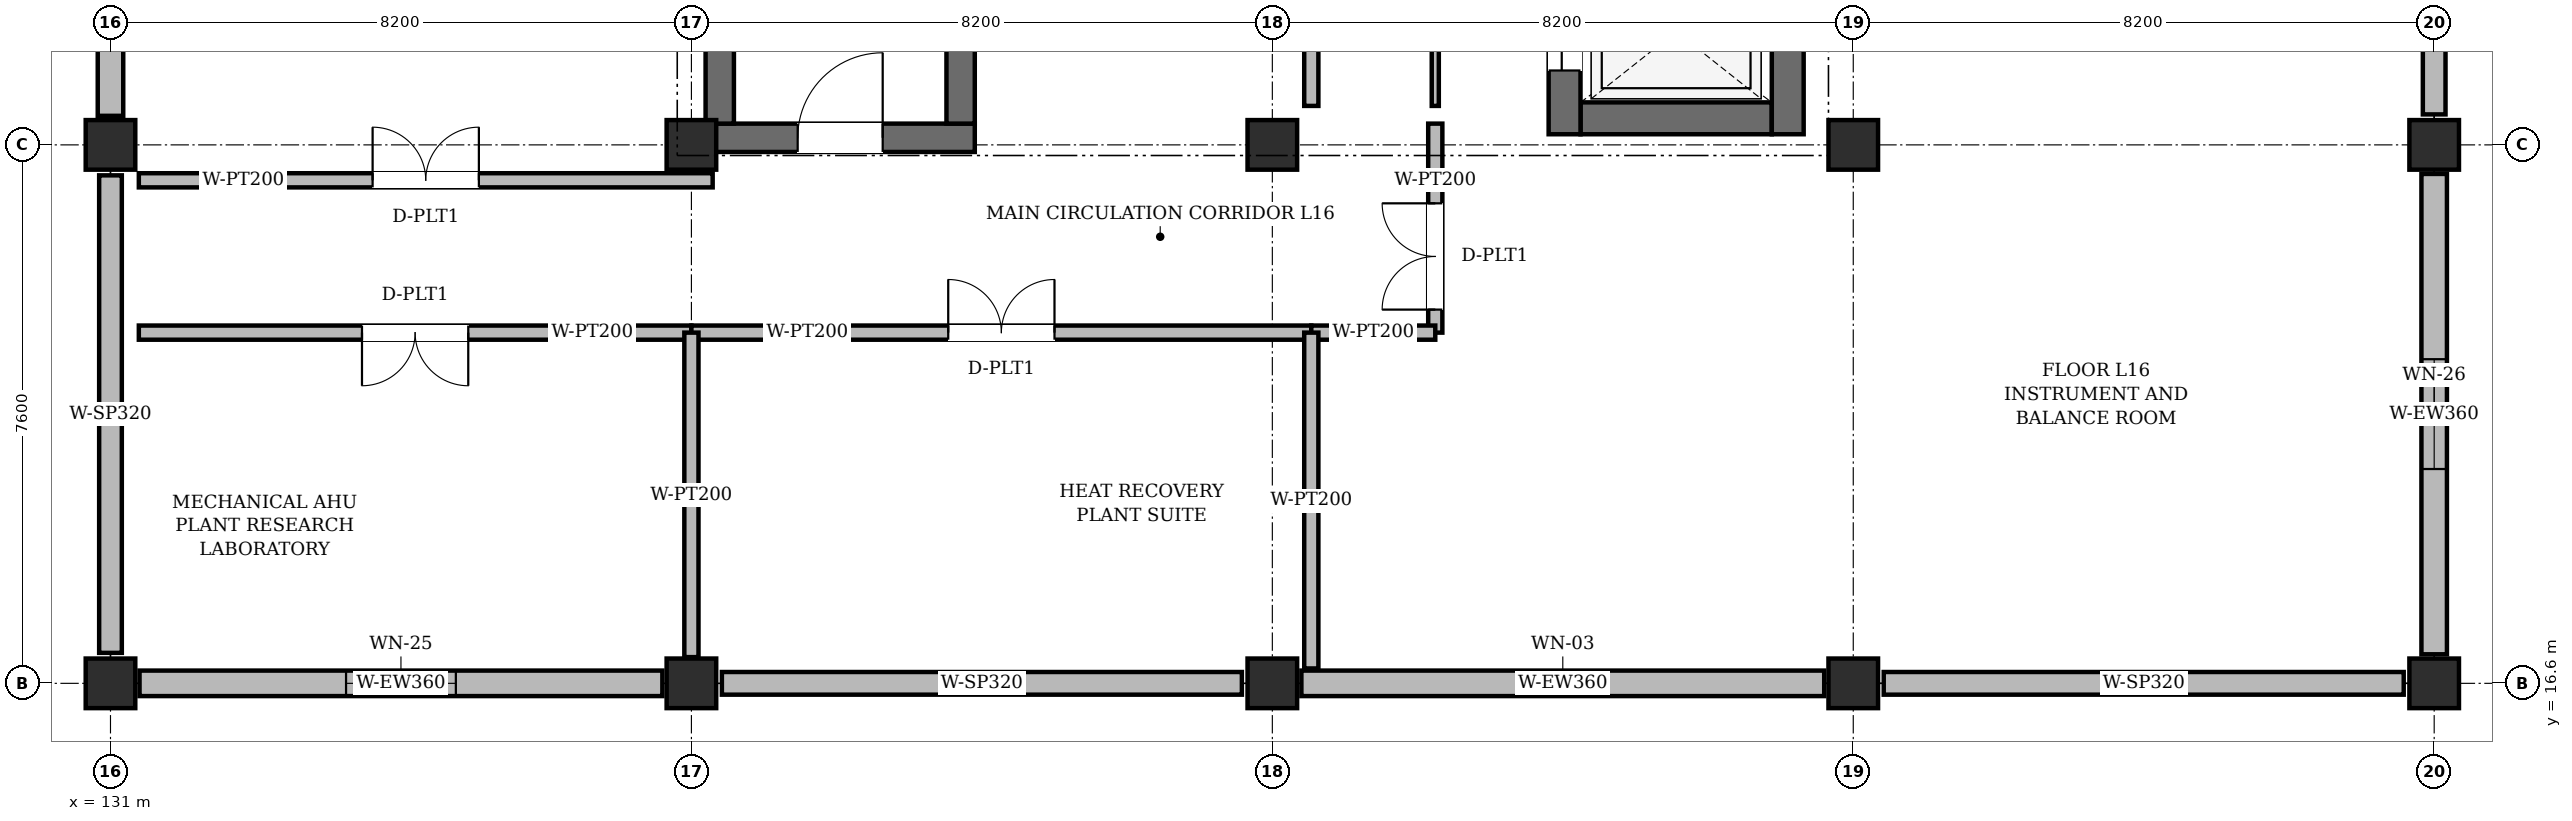
"""IFC4 building model, lengths in metres.
Left out: names, types, materials, properties, quantities, classifications, styles, units other than length and angle.
Written with IfcOpenShell. Run it as: python <this file> out.ifc"""

import sys

from ifc_helpers import new_model, si_unit, direction, frame, frame_2d, origin, origin_2d, place, context, subcontext, project, spatial, rectangle, extrude, element, fill, save


model = new_model("IFC4")
c1 = context("Model", 3, precision=1e-05, world=origin(), true_north=direction((0.0, 1.0)))
c2 = subcontext(c1, "Body", "Model", "MODEL_VIEW")
j1 = project(units=[si_unit("LENGTHUNIT", "METRE"), si_unit("PLANEANGLEUNIT", "RADIAN")], contexts=[c1])
p1 = place(None, origin())
s1 = spatial("IfcSite", under=j1, at=p1, CompositionType="ELEMENT")
p2 = place(p1, origin())
s2 = spatial("IfcBuilding", under=s1, at=p2, CompositionType="ELEMENT")
p3 = place(p2, frame((0.0, 0.0, 70.2)))
s3 = spatial("IfcBuildingStorey", under=s2, at=p3, CompositionType="ELEMENT", Elevation=70.2)
for number, where, z_axis, x_axis in (
    (1, (131.0, 16.6, 0.0), (0.0, 0.0, 1.0), (1.0, 0.0, 0.0)),
    (2, (131.0, 24.2, 0.0), (0.0, 0.0, 1.0), (1.0, 0.0, 0.0)),
    (3, (139.2, 16.6, 0.0), (0.0, 0.0, 1.0), (1.0, 0.0, 0.0)),
    (4, (139.2, 24.2, 0.0), (0.0, 0.0, 1.0), (1.0, 0.0, 0.0)),
    (5, (147.4, 16.6, 0.0), (0.0, 0.0, 1.0), (1.0, 0.0, 0.0)),
    (6, (147.4, 24.2, 0.0), (0.0, 0.0, 1.0), (1.0, 0.0, 0.0)),
    (7, (155.6, 16.6, 0.0), (0.0, 0.0, 1.0), (1.0, 0.0, 0.0)),
    (8, (155.6, 24.2, 0.0), (0.0, 0.0, 1.0), (1.0, 0.0, 0.0)),
    (9, (163.8, 16.6, 0.0), (0.0, 0.0, 1.0), (1.0, 0.0, 0.0)),
    (10, (163.8, 24.2, 0.0), (0.0, 0.0, 1.0), (1.0, 0.0, 0.0)),
):
    element("IfcColumn", number, at=place(p3, frame(where, z_axis=z_axis, x_axis=x_axis)), inside=s3, PredefinedType="COLUMN", context=c2, shape_type="SweptSolid", body=[
        extrude(rectangle(XDim=0.7, YDim=0.7, at=origin_2d()), origin(), (0.0, 0.0, 1.0), 3.67),
    ])
p4 = place(p3, frame((131.41, 16.6, 0.0), z_axis=(0.0, 0.0, 1.0), x_axis=(1.0, 0.0, 0.0)))
e11 = element("IfcWall", 11, at=p4, inside=s3, PredefinedType="SOLIDWALL", context=c2, shape_type="SweptSolid", body=[
    extrude(rectangle(XDim=7.38, YDim=0.36, at=frame_2d((3.69, 0.0))), origin(), (0.0, 0.0, 1.0), 3.055),
])
p5 = place(p4, frame((2.915, 0.0, 0.95)))
e12 = element("IfcOpeningElement", 12, at=p5, cuts=e11, PredefinedType="OPENING", context=c2, shape_type="SweptSolid", body=[
    extrude(rectangle(XDim=1.55, YDim=1.25, at=frame_2d((0.775, 0.625))), frame((0.0, 0.192, 0.0), z_axis=(0.0, -1.0, 0.0), x_axis=(1.0, 0.0, 0.0)), (0.0, 0.0, 1.0), 0.384),
])
p6 = place(p3, frame((139.63, 16.6, 0.0), z_axis=(0.0, 0.0, 1.0), x_axis=(1.0, 0.0, 0.0)))
e13 = element("IfcWall", 13, at=p6, inside=s3, PredefinedType="PARAPET", context=c2, shape_type="SweptSolid", body=[
    extrude(rectangle(XDim=7.34, YDim=0.32, at=frame_2d((3.67, 0.0))), origin(), (0.0, 0.0, 1.0), 0.25),
])
p7 = place(p3, frame((147.81, 16.6, 0.0), z_axis=(0.0, 0.0, 1.0), x_axis=(1.0, 0.0, 0.0)))
e14 = element("IfcWall", 14, at=p7, inside=s3, PredefinedType="SOLIDWALL", context=c2, shape_type="SweptSolid", body=[
    extrude(rectangle(XDim=7.38, YDim=0.36, at=frame_2d((3.69, 0.0))), origin(), (0.0, 0.0, 1.0), 3.055),
])
p8 = place(p7, frame((3.315, 0.0, 0.95)))
e15 = element("IfcOpeningElement", 15, at=p8, cuts=e14, PredefinedType="OPENING", context=c2, shape_type="SweptSolid", body=[
    extrude(rectangle(XDim=0.75, YDim=1.8, at=frame_2d((0.375, 0.9))), frame((0.0, 0.192, 0.0), z_axis=(0.0, -1.0, 0.0), x_axis=(1.0, 0.0, 0.0)), (0.0, 0.0, 1.0), 0.384),
])
p9 = place(p3, frame((156.03, 16.6, 0.0), z_axis=(0.0, 0.0, 1.0), x_axis=(1.0, 0.0, 0.0)))
e16 = element("IfcWall", 16, at=p9, inside=s3, PredefinedType="PARAPET", context=c2, shape_type="SweptSolid", body=[
    extrude(rectangle(XDim=7.34, YDim=0.32, at=frame_2d((3.67, 0.0))), origin(), (0.0, 0.0, 1.0), 0.25),
])
p10 = place(p3, frame((163.8, 17.01, 0.0), z_axis=(0.0, 0.0, 1.0), x_axis=(0.0, 1.0, 0.0)))
e17 = element("IfcWall", 17, at=p10, inside=s3, PredefinedType="SOLIDWALL", context=c2, shape_type="SweptSolid", body=[
    extrude(rectangle(XDim=6.78, YDim=0.36, at=frame_2d((3.39, 0.0))), origin(), (0.0, 0.0, 1.0), 3.055),
])
p11 = place(p10, frame((2.615, 0.0, 0.95)))
e18 = element("IfcOpeningElement", 18, at=p11, cuts=e17, PredefinedType="OPENING", context=c2, shape_type="SweptSolid", body=[
    extrude(rectangle(XDim=1.55, YDim=1.5, at=frame_2d((0.775, 0.75))), frame((0.0, 0.192, 0.0), z_axis=(0.0, -1.0, 0.0), x_axis=(1.0, 0.0, 0.0)), (0.0, 0.0, 1.0), 0.384),
])
p12 = place(p3, frame((163.8, 24.63, 0.0), z_axis=(0.0, 0.0, 1.0), x_axis=(0.0, 1.0, 0.0)))
e19 = element("IfcWall", 19, at=p12, inside=s3, PredefinedType="PARAPET", context=c2, shape_type="SweptSolid", body=[
    extrude(rectangle(XDim=6.74, YDim=0.32, at=frame_2d((3.37, 0.0))), origin(), (0.0, 0.0, 1.0), 0.25),
])
p13 = place(p3, frame((131.0, 31.39, 0.0), z_axis=(0.0, 0.0, 1.0), x_axis=(0.0, -1.0, 0.0)))
e20 = element("IfcWall", 20, at=p13, inside=s3, PredefinedType="SOLIDWALL", context=c2, shape_type="SweptSolid", body=[
    extrude(rectangle(XDim=6.78, YDim=0.36, at=frame_2d((3.39, 0.0))), origin(), (0.0, 0.0, 1.0), 3.055),
])
p14 = place(p13, frame((2.64, 0.0, 0.75)))
e21 = element("IfcOpeningElement", 21, at=p14, cuts=e20, PredefinedType="OPENING", context=c2, shape_type="SweptSolid", body=[
    extrude(rectangle(XDim=1.5, YDim=2.1, at=frame_2d((0.75, 1.05))), frame((0.0, 0.192, 0.0), z_axis=(0.0, -1.0, 0.0), x_axis=(1.0, 0.0, 0.0)), (0.0, 0.0, 1.0), 0.384),
])
p15 = place(p3, frame((131.0, 23.77, 0.0), z_axis=(0.0, 0.0, 1.0), x_axis=(0.0, -1.0, 0.0)))
e22 = element("IfcWall", 22, at=p15, inside=s3, PredefinedType="PARAPET", context=c2, shape_type="SweptSolid", body=[
    extrude(rectangle(XDim=6.74, YDim=0.32, at=frame_2d((3.37, 0.0))), origin(), (0.0, 0.0, 1.0), 0.25),
])
p16 = place(p3, frame((139.4, 24.3, 0.0), z_axis=(0.0, 0.0, 1.0), x_axis=(1.0, 0.0, 0.0)))
e23 = element("IfcWall", 23, at=p16, inside=s3, PredefinedType="SHEAR", context=c2, shape_type="SweptSolid", body=[
    extrude(rectangle(XDim=3.8, YDim=0.4, at=frame_2d((1.9, 0.0))), origin(), (0.0, 0.0, 1.0), 3.67),
])
p17 = place(p16, frame((1.3, 0.0, 0.0)))
e24 = element("IfcOpeningElement", 24, at=p17, cuts=e23, PredefinedType="OPENING", context=c2, shape_type="SweptSolid", body=[
    extrude(rectangle(XDim=1.2, YDim=2.2, at=frame_2d((0.6, 1.1))), frame((0.0, 0.212, 0.0), z_axis=(0.0, -1.0, 0.0), x_axis=(1.0, 0.0, 0.0)), (0.0, 0.0, 1.0), 0.424),
])
for number, where, z_axis, x_axis in (
    (25, (139.6, 24.5, 0.0), (0.0, 0.0, 1.0), (0.0, 1.0, 0.0)),
    (26, (143.0, 24.5, 0.0), (0.0, 0.0, 1.0), (0.0, 1.0, 0.0)),
):
    element("IfcWall", number, at=place(p3, frame(where, z_axis=z_axis, x_axis=x_axis)), inside=s3, PredefinedType="SHEAR", context=c2, shape_type="SweptSolid", body=[
        extrude(rectangle(XDim=7.0, YDim=0.4, at=frame_2d((3.5, 0.0))), origin(), (0.0, 0.0, 1.0), 3.67),
    ])
p18 = place(p3, frame((151.75, 24.575, 0.0), z_axis=(0.0, 0.0, 1.0), x_axis=(1.0, 0.0, 0.0)))
e27 = element("IfcWall", 27, at=p18, inside=s3, PredefinedType="SHEAR", context=c2, shape_type="SweptSolid", body=[
    extrude(rectangle(XDim=2.7, YDim=0.45, at=frame_2d((1.35, 0.0))), origin(), (0.0, 0.0, 1.0), 3.67),
])
p19 = place(p3, frame((151.525, 24.35, 0.0), z_axis=(0.0, 0.0, 1.0), x_axis=(0.0, 1.0, 0.0)))
e28 = element("IfcWall", 28, at=p19, inside=s3, PredefinedType="SHEAR", context=c2, shape_type="SweptSolid", body=[
    extrude(rectangle(XDim=2.9, YDim=0.45, at=frame_2d((1.45, 0.0))), origin(), (0.0, 0.0, 1.0), 3.67),
])
p20 = place(p19, frame((0.9, 0.0, 0.0)))
e29 = element("IfcOpeningElement", 29, at=p20, cuts=e28, PredefinedType="OPENING", context=c2, shape_type="SweptSolid", body=[
    extrude(rectangle(XDim=1.1, YDim=2.2, at=frame_2d((0.55, 1.1))), frame((0.0, 0.237, 0.0), z_axis=(0.0, -1.0, 0.0), x_axis=(1.0, 0.0, 0.0)), (0.0, 0.0, 1.0), 0.474),
])
p21 = place(p3, frame((154.675, 24.35, 0.0), z_axis=(0.0, 0.0, 1.0), x_axis=(0.0, 1.0, 0.0)))
e30 = element("IfcWall", 30, at=p21, inside=s3, PredefinedType="SHEAR", context=c2, shape_type="SweptSolid", body=[
    extrude(rectangle(XDim=2.9, YDim=0.45, at=frame_2d((1.45, 0.0))), origin(), (0.0, 0.0, 1.0), 3.67),
])
p22 = place(p3, frame((147.95, 31.75, 0.0), z_axis=(0.0, 0.0, 1.0), x_axis=(0.0, -1.0, 0.0)))
e31 = element("IfcWall", 31, at=p22, inside=s3, PredefinedType="PARTITIONING", context=c2, shape_type="SweptSolid", body=[
    extrude(rectangle(XDim=7.0, YDim=0.2, at=frame_2d((3.5, 0.0))), origin(), (0.0, 0.0, 1.0), 3.605),
])
p23 = place(p22, frame((2.75, 0.0, 0.0)))
e32 = element("IfcOpeningElement", 32, at=p23, cuts=e31, PredefinedType="OPENING", context=c2, shape_type="SweptSolid", body=[
    extrude(rectangle(XDim=1.5, YDim=2.2, at=frame_2d((0.75, 1.1))), frame((0.0, 0.112, 0.0), z_axis=(0.0, -1.0, 0.0), x_axis=(1.0, 0.0, 0.0)), (0.0, 0.0, 1.0), 0.224),
])
p24 = place(p3, frame((149.7, 24.75, 0.0), z_axis=(0.0, 0.0, 1.0), x_axis=(0.0, 1.0, 0.0)))
e33 = element("IfcWall", 33, at=p24, inside=s3, PredefinedType="PARTITIONING", context=c2, shape_type="SweptSolid", body=[
    extrude(rectangle(XDim=11.3, YDim=0.1, at=frame_2d((5.65, 0.0))), origin(), (0.0, 0.0, 1.0), 3.605),
])
p25 = place(p24, frame((4.75, 0.0, 0.0)))
e34 = element("IfcOpeningElement", 34, at=p25, cuts=e33, PredefinedType="OPENING", context=c2, shape_type="SweptSolid", body=[
    extrude(rectangle(XDim=1.8, YDim=2.4, at=frame_2d((0.9, 1.2))), frame((0.0, 0.062, 0.0), z_axis=(0.0, -1.0, 0.0), x_axis=(1.0, 0.0, 0.0)), (0.0, 0.0, 1.0), 0.124),
])
p26 = place(p3, frame((139.2, 21.55, 0.0), z_axis=(0.0, 0.0, 1.0), x_axis=(-1.0, 0.0, 0.0)))
e35 = element("IfcWall", 35, at=p26, inside=s3, PredefinedType="PARTITIONING", context=c2, shape_type="SweptSolid", body=[
    extrude(rectangle(XDim=7.8, YDim=0.2, at=frame_2d((3.9, 0.0))), origin(), (0.0, 0.0, 1.0), 3.315),
])
p27 = place(p26, frame((3.15, 0.0, 0.0)))
e36 = element("IfcOpeningElement", 36, at=p27, cuts=e35, PredefinedType="OPENING", context=c2, shape_type="SweptSolid", body=[
    extrude(rectangle(XDim=1.5, YDim=2.2, at=frame_2d((0.75, 1.1))), frame((0.0, 0.112, 0.0), z_axis=(0.0, -1.0, 0.0), x_axis=(1.0, 0.0, 0.0)), (0.0, 0.0, 1.0), 0.224),
])
p28 = place(p3, frame((147.95, 21.55, 0.0), z_axis=(0.0, 0.0, 1.0), x_axis=(-1.0, 0.0, 0.0)))
e37 = element("IfcWall", 37, at=p28, inside=s3, PredefinedType="PARTITIONING", context=c2, shape_type="SweptSolid", body=[
    extrude(rectangle(XDim=8.75, YDim=0.2, at=frame_2d((4.375, 0.0))), origin(), (0.0, 0.0, 1.0), 3.245),
])
p29 = place(p28, frame((3.625, 0.0, 0.0)))
e38 = element("IfcOpeningElement", 38, at=p29, cuts=e37, PredefinedType="OPENING", context=c2, shape_type="SweptSolid", body=[
    extrude(rectangle(XDim=1.5, YDim=2.2, at=frame_2d((0.75, 1.1))), frame((0.0, 0.112, 0.0), z_axis=(0.0, -1.0, 0.0), x_axis=(1.0, 0.0, 0.0)), (0.0, 0.0, 1.0), 0.224),
])
p30 = place(p3, frame((131.4, 23.7, 0.0), z_axis=(0.0, 0.0, 1.0), x_axis=(1.0, 0.0, 0.0)))
e39 = element("IfcWall", 39, at=p30, inside=s3, PredefinedType="PARTITIONING", context=c2, shape_type="SweptSolid", body=[
    extrude(rectangle(XDim=8.1, YDim=0.2, at=frame_2d((4.05, 0.0))), origin(), (0.0, 0.0, 1.0), 3.605),
])
p31 = place(p30, frame((3.3, 0.0, 0.0)))
e40 = element("IfcOpeningElement", 40, at=p31, cuts=e39, PredefinedType="OPENING", context=c2, shape_type="SweptSolid", body=[
    extrude(rectangle(XDim=1.5, YDim=2.2, at=frame_2d((0.75, 1.1))), frame((0.0, 0.112, 0.0), z_axis=(0.0, -1.0, 0.0), x_axis=(1.0, 0.0, 0.0)), (0.0, 0.0, 1.0), 0.224),
])
p32 = place(p3, frame((149.7, 24.5, 0.0), z_axis=(0.0, 0.0, 1.0), x_axis=(0.0, -1.0, 0.0)))
e41 = element("IfcWall", 41, at=p32, inside=s3, PredefinedType="PARTITIONING", context=c2, shape_type="SweptSolid", body=[
    extrude(rectangle(XDim=0.8, YDim=0.2, at=frame_2d((0.4, 0.0))), origin(), (0.0, 0.0, 1.0), 3.605),
])
p33 = place(p3, frame((149.7, 23.7, 0.0), z_axis=(0.0, 0.0, 1.0), x_axis=(0.0, -1.0, 0.0)))
e42 = element("IfcWall", 42, at=p33, inside=s3, PredefinedType="PARTITIONING", context=c2, shape_type="SweptSolid", body=[
    extrude(rectangle(XDim=2.15, YDim=0.2, at=frame_2d((1.075, 0.0))), origin(), (0.0, 0.0, 1.0), 3.605),
])
p34 = place(p33, frame((0.325, 0.0, 0.0)))
e43 = element("IfcOpeningElement", 43, at=p34, cuts=e42, PredefinedType="OPENING", context=c2, shape_type="SweptSolid", body=[
    extrude(rectangle(XDim=1.5, YDim=2.2, at=frame_2d((0.75, 1.1))), frame((0.0, 0.112, 0.0), z_axis=(0.0, -1.0, 0.0), x_axis=(1.0, 0.0, 0.0)), (0.0, 0.0, 1.0), 0.224),
])
p35 = place(p3, frame((149.7, 21.55, 0.0), z_axis=(0.0, 0.0, 1.0), x_axis=(-1.0, 0.0, 0.0)))
e44 = element("IfcWall", 44, at=p35, inside=s3, PredefinedType="PARTITIONING", context=c2, shape_type="SweptSolid", body=[
    extrude(rectangle(XDim=1.75, YDim=0.2, at=frame_2d((0.875, 0.0))), origin(), (0.0, 0.0, 1.0), 3.245),
])
p36 = place(p3, frame((139.2, 21.55, 0.0), z_axis=(0.0, 0.0, 1.0), x_axis=(0.0, -1.0, 0.0)))
e45 = element("IfcWall", 45, at=p36, inside=s3, PredefinedType="PARTITIONING", context=c2, shape_type="SweptSolid", body=[
    extrude(rectangle(XDim=4.58, YDim=0.2, at=frame_2d((2.29, 0.0))), origin(), (0.0, 0.0, 1.0), 3.005),
])
p37 = place(p3, frame((147.95, 21.55, 0.0), z_axis=(0.0, 0.0, 1.0), x_axis=(0.0, -1.0, 0.0)))
e46 = element("IfcWall", 46, at=p37, inside=s3, PredefinedType="PARTITIONING", context=c2, shape_type="SweptSolid", body=[
    extrude(rectangle(XDim=4.74, YDim=0.2, at=frame_2d((2.37, 0.0))), origin(), (0.0, 0.0, 1.0), 3.605),
])
p38 = place(p5, origin())
e47 = element("IfcWindow", 47, at=p38, inside=s3, PartitioningType="DOUBLE_PANEL_VERTICAL", PredefinedType="WINDOW", context=c2, shape_type="SweptSolid", body=[
    extrude(rectangle(XDim=1.55, YDim=1.25, at=frame_2d((0.775, 0.625))), frame((0.0, 0.03, 0.0), z_axis=(0.0, -1.0, 0.0), x_axis=(1.0, 0.0, 0.0)), (0.0, 0.0, 1.0), 0.06),
])
fill(e12, e47)
p39 = place(p8, origin())
e48 = element("IfcWindow", 48, at=p39, inside=s3, PartitioningType="SINGLE_PANEL", PredefinedType="WINDOW", context=c2, shape_type="SweptSolid", body=[
    extrude(rectangle(XDim=0.75, YDim=1.8, at=frame_2d((0.375, 0.9))), frame((0.0, 0.03, 0.0), z_axis=(0.0, -1.0, 0.0), x_axis=(1.0, 0.0, 0.0)), (0.0, 0.0, 1.0), 0.06),
])
fill(e15, e48)
p40 = place(p11, origin())
e49 = element("IfcWindow", 49, at=p40, inside=s3, PartitioningType="DOUBLE_PANEL_VERTICAL", PredefinedType="WINDOW", context=c2, shape_type="SweptSolid", body=[
    extrude(rectangle(XDim=1.55, YDim=1.5, at=frame_2d((0.775, 0.75))), frame((0.0, 0.03, 0.0), z_axis=(0.0, -1.0, 0.0), x_axis=(1.0, 0.0, 0.0)), (0.0, 0.0, 1.0), 0.06),
])
fill(e18, e49)
p41 = place(p17, origin())
e50 = element("IfcDoor", 50, at=p41, inside=s3, OperationType="SINGLE_SWING_RIGHT", PredefinedType="DOOR", context=c2, shape_type="SweptSolid", body=[
    extrude(rectangle(XDim=1.2, YDim=2.2, at=frame_2d((0.6, 1.1))), frame((0.0, 0.025, 0.0), z_axis=(0.0, -1.0, 0.0), x_axis=(1.0, 0.0, 0.0)), (0.0, 0.0, 1.0), 0.05),
])
fill(e24, e50)
p42 = place(p20, origin())
e51 = element("IfcDoor", 51, at=p42, inside=s3, OperationType="DOUBLE_DOOR_SLIDING", PredefinedType="DOOR", context=c2, shape_type="SweptSolid", body=[
    extrude(rectangle(XDim=1.1, YDim=2.2, at=frame_2d((0.55, 1.1))), frame((0.0, 0.025, 0.0), z_axis=(0.0, -1.0, 0.0), x_axis=(1.0, 0.0, 0.0)), (0.0, 0.0, 1.0), 0.05),
])
fill(e29, e51)
p43 = place(p27, origin())
e52 = element("IfcDoor", 52, at=p43, inside=s3, OperationType="DOUBLE_DOOR_SINGLE_SWING", PredefinedType="DOOR", context=c2, shape_type="SweptSolid", body=[
    extrude(rectangle(XDim=1.5, YDim=2.2, at=frame_2d((0.75, 1.1))), frame((0.0, 0.025, 0.0), z_axis=(0.0, -1.0, 0.0), x_axis=(1.0, 0.0, 0.0)), (0.0, 0.0, 1.0), 0.05),
])
fill(e36, e52)
p44 = place(p29, frame((1.5, 0.0, 0.0), z_axis=(0.0, 0.0, 1.0), x_axis=(-1.0, 0.0, 0.0)))
e53 = element("IfcDoor", 53, at=p44, inside=s3, OperationType="DOUBLE_DOOR_SINGLE_SWING", PredefinedType="DOOR", context=c2, shape_type="SweptSolid", body=[
    extrude(rectangle(XDim=1.5, YDim=2.2, at=frame_2d((0.75, 1.1))), frame((0.0, 0.025, 0.0), z_axis=(0.0, -1.0, 0.0), x_axis=(1.0, 0.0, 0.0)), (0.0, 0.0, 1.0), 0.05),
])
fill(e38, e53)
p45 = place(p31, origin())
e54 = element("IfcDoor", 54, at=p45, inside=s3, OperationType="DOUBLE_DOOR_SINGLE_SWING", PredefinedType="DOOR", context=c2, shape_type="SweptSolid", body=[
    extrude(rectangle(XDim=1.5, YDim=2.2, at=frame_2d((0.75, 1.1))), frame((0.0, 0.025, 0.0), z_axis=(0.0, -1.0, 0.0), x_axis=(1.0, 0.0, 0.0)), (0.0, 0.0, 1.0), 0.05),
])
fill(e40, e54)
p46 = place(p34, frame((1.5, 0.0, 0.0), z_axis=(0.0, 0.0, 1.0), x_axis=(-1.0, 0.0, 0.0)))
e55 = element("IfcDoor", 55, at=p46, inside=s3, OperationType="DOUBLE_DOOR_SINGLE_SWING", PredefinedType="DOOR", context=c2, shape_type="SweptSolid", body=[
    extrude(rectangle(XDim=1.5, YDim=2.2, at=frame_2d((0.75, 1.1))), frame((0.0, 0.025, 0.0), z_axis=(0.0, -1.0, 0.0), x_axis=(1.0, 0.0, 0.0)), (0.0, 0.0, 1.0), 0.05),
])
fill(e43, e55)
save(model, sys.argv[1])
